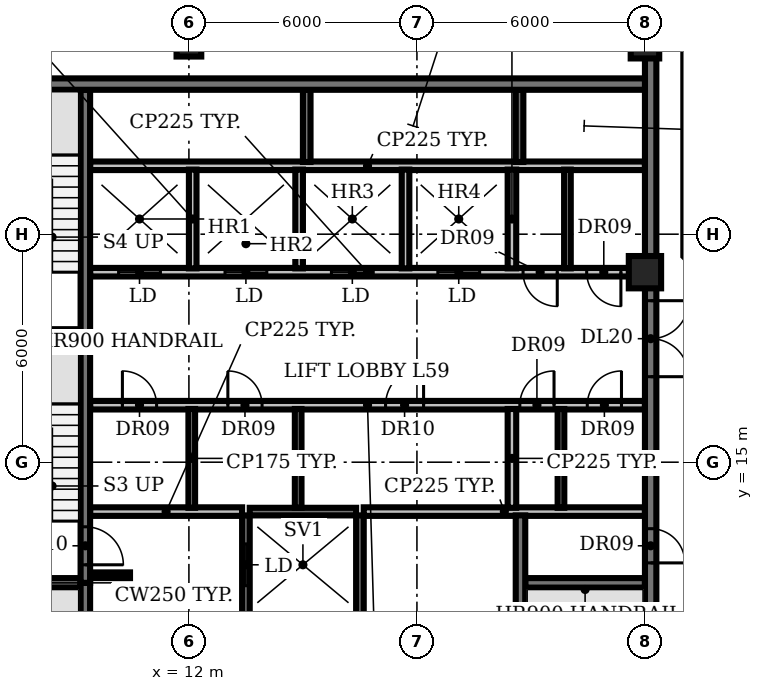
"""IFC4 building model, lengths in metres.
Left out: names, types, materials, properties, quantities, classifications, styles, units other than length and angle.
Written with IfcOpenShell. Run it as: python <this file> out.ifc"""

import sys

from ifc_helpers import new_model, si_unit, direction, frame, frame_2d, origin, origin_2d, place, context, subcontext, project, spatial, rectangle, circle, extrude, element, fill, save


model = new_model("IFC4")
c1 = context("Model", 3, precision=1e-05, world=origin(), true_north=direction((0.0, 1.0)))
c2 = subcontext(c1, "Body", "Model", "MODEL_VIEW")
j1 = project(units=[si_unit("LENGTHUNIT", "METRE"), si_unit("PLANEANGLEUNIT", "RADIAN")], contexts=[c1])
p1 = place(None, origin())
s1 = spatial("IfcSite", under=j1, at=p1, CompositionType="ELEMENT")
p2 = place(p1, origin())
s2 = spatial("IfcBuilding", under=s1, at=p2, CompositionType="ELEMENT")
p3 = place(p2, frame((0.0, 0.0, 268.4)))
s3 = spatial("IfcBuildingStorey", under=s2, at=p3, CompositionType="ELEMENT", Elevation=268.4)
p4 = place(p3, frame((12.0, 26.0, 0.0), z_axis=(0.0, 0.0, 1.0), x_axis=(1.0, 0.0, 0.0)))
e1 = element("IfcColumn", 1, at=p4, inside=s3, PredefinedType="COLUMN", context=c2, shape_type="SweptSolid", body=[
    extrude(rectangle(XDim=0.65, YDim=0.65, at=origin_2d()), origin(), (0.0, 0.0, 1.0), 3.8),
])
p5 = place(p3, frame((24.0, 20.0, 0.0), z_axis=(0.0, 0.0, 1.0), x_axis=(1.0, 0.0, 0.0)))
e2 = element("IfcColumn", 2, at=p5, inside=s3, PredefinedType="COLUMN", context=c2, shape_type="SweptSolid", body=[
    extrude(circle(Radius=0.425, at=origin_2d()), origin(), (0.0, 0.0, 1.0), 3.8),
])
p6 = place(p3, frame((24.0, 26.0, 0.0), z_axis=(0.0, 0.0, 1.0), x_axis=(1.0, 0.0, 0.0)))
e3 = element("IfcColumn", 3, at=p6, inside=s3, PredefinedType="COLUMN", context=c2, shape_type="SweptSolid", body=[
    extrude(rectangle(XDim=0.75, YDim=0.75, at=origin_2d()), origin(), (0.0, 0.0, 1.0), 3.8),
])
for number, where, z_axis, x_axis in (
    (4, (6.0, 11.825, 0.0), (0.0, 0.0, 1.0), (1.0, 0.0, 0.0)),
    (5, (20.85, 11.825, 0.0), (0.0, 0.0, 1.0), (1.0, 0.0, 0.0)),
):
    element("IfcWall", number, at=place(p3, frame(where, z_axis=z_axis, x_axis=x_axis)), inside=s3, PredefinedType="SHEAR", context=c2, shape_type="SweptSolid", body=[
        extrude(rectangle(XDim=3.15, YDim=0.25, at=frame_2d((1.575, 0.0))), origin(), (0.0, 0.0, 1.0), 3.8),
    ])
p7 = place(p3, frame((9.4, 12.025, 0.0), z_axis=(0.0, 0.0, 1.0), x_axis=(1.0, 0.0, 0.0)))
e6 = element("IfcWall", 6, at=p7, inside=s3, PredefinedType="SHEAR", context=c2, shape_type="SweptSolid", body=[
    extrude(rectangle(XDim=1.05, YDim=0.15, at=frame_2d((0.525, 0.0))), origin(), (0.0, 0.0, 1.0), 3.8),
])
p8 = place(p3, frame((9.4, 13.7, 0.0), z_axis=(0.0, 0.0, 1.0), x_axis=(1.0, 0.0, 0.0)))
e7 = element("IfcWall", 7, at=p8, inside=s3, PredefinedType="PARTITIONING", context=c2, shape_type="SweptSolid", body=[
    extrude(rectangle(XDim=4.0, YDim=0.225, at=frame_2d((2.0, 0.0))), origin(), (0.0, 0.0, 1.0), 3.8),
])
p9 = place(p3, frame((13.6, 13.7, 0.0), z_axis=(0.0, 0.0, 1.0), x_axis=(1.0, 0.0, 0.0)))
e8 = element("IfcWall", 8, at=p9, inside=s3, PredefinedType="SHEAR", context=c2, shape_type="SweptSolid", body=[
    extrude(rectangle(XDim=2.8, YDim=0.2, at=frame_2d((1.4, 0.0))), origin(), (0.0, 0.0, 1.0), 3.8),
])
p10 = place(p3, frame((16.6, 13.7, 0.0), z_axis=(0.0, 0.0, 1.0), x_axis=(1.0, 0.0, 0.0)))
e9 = element("IfcWall", 9, at=p10, inside=s3, PredefinedType="PARTITIONING", context=c2, shape_type="SweptSolid", body=[
    extrude(rectangle(XDim=7.4, YDim=0.225, at=frame_2d((3.7, 0.0))), origin(), (0.0, 0.0, 1.0), 3.8),
])
p11 = place(p3, frame((9.4, 16.5, 0.0), z_axis=(0.0, 0.0, 1.0), x_axis=(1.0, 0.0, 0.0)))
e10 = element("IfcWall", 10, at=p11, inside=s3, PredefinedType="PARTITIONING", context=c2, shape_type="SweptSolid", body=[
    extrude(rectangle(XDim=14.6, YDim=0.225, at=frame_2d((7.3, 0.0))), origin(), (0.0, 0.0, 1.0), 3.8),
])
p12 = place(p11, frame((0.85, 0.0, 0.0)))
e11 = element("IfcOpeningElement", 11, at=p12, cuts=e10, PredefinedType="OPENING", context=c2, shape_type="SweptSolid", body=[
    extrude(rectangle(XDim=0.9, YDim=2.1, at=frame_2d((0.45, 1.05))), frame((0.0, 0.123, 0.0), z_axis=(0.0, -1.0, 0.0), x_axis=(1.0, 0.0, 0.0)), (0.0, 0.0, 1.0), 0.245),
])
p13 = place(p11, frame((3.625, 0.0, 0.0)))
e12 = element("IfcOpeningElement", 12, at=p13, cuts=e10, PredefinedType="OPENING", context=c2, shape_type="SweptSolid", body=[
    extrude(rectangle(XDim=0.9, YDim=2.1, at=frame_2d((0.45, 1.05))), frame((0.0, 0.123, 0.0), z_axis=(0.0, -1.0, 0.0), x_axis=(1.0, 0.0, 0.0)), (0.0, 0.0, 1.0), 0.245),
])
p14 = place(p11, frame((7.775, 0.0, 0.0)))
e13 = element("IfcOpeningElement", 13, at=p14, cuts=e10, PredefinedType="OPENING", context=c2, shape_type="SweptSolid", body=[
    extrude(rectangle(XDim=1.0, YDim=2.1, at=frame_2d((0.5, 1.05))), frame((0.0, 0.123, 0.0), z_axis=(0.0, -1.0, 0.0), x_axis=(1.0, 0.0, 0.0)), (0.0, 0.0, 1.0), 0.245),
])
p15 = place(p11, frame((11.308, 0.0, 0.0)))
e14 = element("IfcOpeningElement", 14, at=p15, cuts=e10, PredefinedType="OPENING", context=c2, shape_type="SweptSolid", body=[
    extrude(rectangle(XDim=0.9, YDim=2.1, at=frame_2d((0.45, 1.05))), frame((0.0, 0.123, 0.0), z_axis=(0.0, -1.0, 0.0), x_axis=(1.0, 0.0, 0.0)), (0.0, 0.0, 1.0), 0.245),
])
p16 = place(p11, frame((13.083, 0.0, 0.0)))
e15 = element("IfcOpeningElement", 15, at=p16, cuts=e10, PredefinedType="OPENING", context=c2, shape_type="SweptSolid", body=[
    extrude(rectangle(XDim=0.9, YDim=2.1, at=frame_2d((0.45, 1.05))), frame((0.0, 0.123, 0.0), z_axis=(0.0, -1.0, 0.0), x_axis=(1.0, 0.0, 0.0)), (0.0, 0.0, 1.0), 0.245),
])
p17 = place(p3, frame((6.0, 18.375, 0.0), z_axis=(0.0, 0.0, 1.0), x_axis=(1.0, 0.0, 0.0)))
e16 = element("IfcWall", 16, at=p17, inside=s3, PredefinedType="SHEAR", context=c2, shape_type="SweptSolid", body=[
    extrude(rectangle(XDim=3.15, YDim=0.25, at=frame_2d((1.575, 0.0))), origin(), (0.0, 0.0, 1.0), 3.8),
])
p18 = place(p3, frame((24.0, 20.0, 0.0), z_axis=(0.0, 0.0, 1.0), x_axis=(-1.0, 0.0, 0.0)))
e17 = element("IfcWall", 17, at=p18, inside=s3, PredefinedType="PARTITIONING", context=c2, shape_type="SweptSolid", body=[
    extrude(rectangle(XDim=14.6, YDim=0.225, at=frame_2d((7.3, 0.0))), origin(), (0.0, 0.0, 1.0), 3.8),
])
p19 = place(p18, frame((12.75, 0.0, 0.0)))
e18 = element("IfcOpeningElement", 18, at=p19, cuts=e17, PredefinedType="OPENING", context=c2, shape_type="SweptSolid", body=[
    extrude(rectangle(XDim=1.1, YDim=2.1, at=frame_2d((0.55, 1.05))), frame((0.0, 0.123, 0.0), z_axis=(0.0, -1.0, 0.0), x_axis=(1.0, 0.0, 0.0)), (0.0, 0.0, 1.0), 0.245),
])
p20 = place(p18, frame((9.95, 0.0, 0.0)))
e19 = element("IfcOpeningElement", 19, at=p20, cuts=e17, PredefinedType="OPENING", context=c2, shape_type="SweptSolid", body=[
    extrude(rectangle(XDim=1.1, YDim=2.1, at=frame_2d((0.55, 1.05))), frame((0.0, 0.123, 0.0), z_axis=(0.0, -1.0, 0.0), x_axis=(1.0, 0.0, 0.0)), (0.0, 0.0, 1.0), 0.245),
])
p21 = place(p18, frame((7.15, 0.0, 0.0)))
e20 = element("IfcOpeningElement", 20, at=p21, cuts=e17, PredefinedType="OPENING", context=c2, shape_type="SweptSolid", body=[
    extrude(rectangle(XDim=1.1, YDim=2.1, at=frame_2d((0.55, 1.05))), frame((0.0, 0.123, 0.0), z_axis=(0.0, -1.0, 0.0), x_axis=(1.0, 0.0, 0.0)), (0.0, 0.0, 1.0), 0.245),
])
p22 = place(p18, frame((4.35, 0.0, 0.0)))
e21 = element("IfcOpeningElement", 21, at=p22, cuts=e17, PredefinedType="OPENING", context=c2, shape_type="SweptSolid", body=[
    extrude(rectangle(XDim=1.1, YDim=2.1, at=frame_2d((0.55, 1.05))), frame((0.0, 0.123, 0.0), z_axis=(0.0, -1.0, 0.0), x_axis=(1.0, 0.0, 0.0)), (0.0, 0.0, 1.0), 0.245),
])
p23 = place(p18, frame((2.308, 0.0, 0.0)))
e22 = element("IfcOpeningElement", 22, at=p23, cuts=e17, PredefinedType="OPENING", context=c2, shape_type="SweptSolid", body=[
    extrude(rectangle(XDim=0.9, YDim=2.1, at=frame_2d((0.45, 1.05))), frame((0.0, 0.123, 0.0), z_axis=(0.0, -1.0, 0.0), x_axis=(1.0, 0.0, 0.0)), (0.0, 0.0, 1.0), 0.245),
])
p24 = place(p18, frame((0.633, 0.0, 0.0)))
e23 = element("IfcOpeningElement", 23, at=p24, cuts=e17, PredefinedType="OPENING", context=c2, shape_type="SweptSolid", body=[
    extrude(rectangle(XDim=0.9, YDim=2.1, at=frame_2d((0.45, 1.05))), frame((0.0, 0.123, 0.0), z_axis=(0.0, -1.0, 0.0), x_axis=(1.0, 0.0, 0.0)), (0.0, 0.0, 1.0), 0.245),
])
p25 = place(p3, frame((9.4, 22.8, 0.0), z_axis=(0.0, 0.0, 1.0), x_axis=(1.0, 0.0, 0.0)))
e24 = element("IfcWall", 24, at=p25, inside=s3, PredefinedType="PARTITIONING", context=c2, shape_type="SweptSolid", body=[
    extrude(rectangle(XDim=14.6, YDim=0.225, at=frame_2d((7.3, 0.0))), origin(), (0.0, 0.0, 1.0), 3.8),
])
p26 = place(p3, frame((9.275, 11.825, 0.0), z_axis=(0.0, 0.0, 1.0), x_axis=(0.0, -1.0, 0.0)))
e25 = element("IfcWall", 25, at=p26, inside=s3, PredefinedType="SHEAR", context=c2, shape_type="SweptSolid", body=[
    extrude(rectangle(XDim=6.425, YDim=0.25, at=frame_2d((3.212, 0.0))), origin(), (0.0, 0.0, 1.0), 3.8),
])
p27 = place(p26, frame((5.075, 0.0, 0.0)))
e26 = element("IfcOpeningElement", 26, at=p27, cuts=e25, PredefinedType="OPENING", context=c2, shape_type="SweptSolid", body=[
    extrude(rectangle(XDim=1.0, YDim=2.1, at=frame_2d((0.5, 1.05))), frame((0.0, 0.135, 0.0), z_axis=(0.0, -1.0, 0.0), x_axis=(1.0, 0.0, 0.0)), (0.0, 0.0, 1.0), 0.27),
])
p28 = place(p3, frame((9.275, 18.375, 0.0), z_axis=(0.0, 0.0, 1.0), x_axis=(0.0, -1.0, 0.0)))
e27 = element("IfcWall", 27, at=p28, inside=s3, PredefinedType="SHEAR", context=c2, shape_type="SweptSolid", body=[
    extrude(rectangle(XDim=6.55, YDim=0.25, at=frame_2d((3.275, 0.0))), origin(), (0.0, 0.0, 1.0), 3.8),
])
p29 = place(p28, frame((5.075, 0.0, 0.0)))
e28 = element("IfcOpeningElement", 28, at=p29, cuts=e27, PredefinedType="OPENING", context=c2, shape_type="SweptSolid", body=[
    extrude(rectangle(XDim=1.0, YDim=2.1, at=frame_2d((0.5, 1.05))), frame((0.0, 0.135, 0.0), z_axis=(0.0, -1.0, 0.0), x_axis=(1.0, 0.0, 0.0)), (0.0, 0.0, 1.0), 0.27),
])
p30 = place(p3, frame((9.275, 18.375, 0.0), z_axis=(0.0, 0.0, 1.0), x_axis=(0.0, 1.0, 0.0)))
e29 = element("IfcWall", 29, at=p30, inside=s3, PredefinedType="SHEAR", context=c2, shape_type="SweptSolid", body=[
    extrude(rectangle(XDim=6.425, YDim=0.25, at=frame_2d((3.212, 0.0))), origin(), (0.0, 0.0, 1.0), 3.8),
])
p31 = place(p3, frame((12.075, 13.8, 0.0), z_axis=(0.0, 0.0, 1.0), x_axis=(0.0, 1.0, 0.0)))
e30 = element("IfcWall", 30, at=p31, inside=s3, PredefinedType="PARTITIONING", context=c2, shape_type="SweptSolid", body=[
    extrude(rectangle(XDim=2.6, YDim=0.175, at=frame_2d((1.3, 0.0))), origin(), (0.0, 0.0, 1.0), 3.8),
])
p32 = place(p3, frame((12.1, 20.1, 0.0), z_axis=(0.0, 0.0, 1.0), x_axis=(0.0, 1.0, 0.0)))
e31 = element("IfcWall", 31, at=p32, inside=s3, PredefinedType="SOLIDWALL", context=c2, shape_type="SweptSolid", body=[
    extrude(rectangle(XDim=2.6, YDim=0.2, at=frame_2d((1.3, 0.0))), origin(), (0.0, 0.0, 1.0), 3.8),
])
p33 = place(p3, frame((13.5, 5.4, 0.0), z_axis=(0.0, 0.0, 1.0), x_axis=(0.0, 1.0, 0.0)))
e32 = element("IfcWall", 32, at=p33, inside=s3, PredefinedType="SHEAR", context=c2, shape_type="SweptSolid", body=[
    extrude(rectangle(XDim=8.2, YDim=0.2, at=frame_2d((4.1, 0.0))), origin(), (0.0, 0.0, 1.0), 3.8),
])
p34 = place(p33, frame((0.75, 0.0, 0.0)))
e33 = element("IfcOpeningElement", 33, at=p34, cuts=e32, PredefinedType="OPENING", context=c2, shape_type="SweptSolid", body=[
    extrude(rectangle(XDim=1.1, YDim=2.1, at=frame_2d((0.55, 1.05))), frame((0.0, 0.11, 0.0), z_axis=(0.0, -1.0, 0.0), x_axis=(1.0, 0.0, 0.0)), (0.0, 0.0, 1.0), 0.22),
])
p35 = place(p33, frame((3.55, 0.0, 0.0)))
e34 = element("IfcOpeningElement", 34, at=p35, cuts=e32, PredefinedType="OPENING", context=c2, shape_type="SweptSolid", body=[
    extrude(rectangle(XDim=1.1, YDim=2.1, at=frame_2d((0.55, 1.05))), frame((0.0, 0.11, 0.0), z_axis=(0.0, -1.0, 0.0), x_axis=(1.0, 0.0, 0.0)), (0.0, 0.0, 1.0), 0.22),
])
p36 = place(p33, frame((6.35, 0.0, 0.0)))
e35 = element("IfcOpeningElement", 35, at=p36, cuts=e32, PredefinedType="OPENING", context=c2, shape_type="SweptSolid", body=[
    extrude(rectangle(XDim=1.1, YDim=2.1, at=frame_2d((0.55, 1.05))), frame((0.0, 0.11, 0.0), z_axis=(0.0, -1.0, 0.0), x_axis=(1.0, 0.0, 0.0)), (0.0, 0.0, 1.0), 0.22),
])
p37 = place(p3, frame((14.875, 13.8, 0.0), z_axis=(0.0, 0.0, 1.0), x_axis=(0.0, 1.0, 0.0)))
e36 = element("IfcWall", 36, at=p37, inside=s3, PredefinedType="PARTITIONING", context=c2, shape_type="SweptSolid", body=[
    extrude(rectangle(XDim=2.6, YDim=0.175, at=frame_2d((1.3, 0.0))), origin(), (0.0, 0.0, 1.0), 3.8),
])
p38 = place(p3, frame((14.9, 20.1, 0.0), z_axis=(0.0, 0.0, 1.0), x_axis=(0.0, 1.0, 0.0)))
e37 = element("IfcWall", 37, at=p38, inside=s3, PredefinedType="SOLIDWALL", context=c2, shape_type="SweptSolid", body=[
    extrude(rectangle(XDim=2.6, YDim=0.2, at=frame_2d((1.3, 0.0))), origin(), (0.0, 0.0, 1.0), 3.8),
])
p39 = place(p3, frame((15.1, 22.9, 0.0), z_axis=(0.0, 0.0, 1.0), x_axis=(0.0, 1.0, 0.0)))
e38 = element("IfcWall", 38, at=p39, inside=s3, PredefinedType="SHEAR", context=c2, shape_type="SweptSolid", body=[
    extrude(rectangle(XDim=1.9, YDim=0.2, at=frame_2d((0.95, 0.0))), origin(), (0.0, 0.0, 1.0), 3.8),
])
p40 = place(p3, frame((16.5, 5.4, 0.0), z_axis=(0.0, 0.0, 1.0), x_axis=(0.0, 1.0, 0.0)))
e39 = element("IfcWall", 39, at=p40, inside=s3, PredefinedType="SHEAR", context=c2, shape_type="SweptSolid", body=[
    extrude(rectangle(XDim=8.2, YDim=0.2, at=frame_2d((4.1, 0.0))), origin(), (0.0, 0.0, 1.0), 3.8),
])
p41 = place(p3, frame((17.7, 20.1, 0.0), z_axis=(0.0, 0.0, 1.0), x_axis=(0.0, 1.0, 0.0)))
e40 = element("IfcWall", 40, at=p41, inside=s3, PredefinedType="SOLIDWALL", context=c2, shape_type="SweptSolid", body=[
    extrude(rectangle(XDim=2.6, YDim=0.2, at=frame_2d((1.3, 0.0))), origin(), (0.0, 0.0, 1.0), 3.8),
])
for number, where, z_axis, x_axis in (
    (41, (20.5, 13.8, 0.0), (0.0, 0.0, 1.0), (0.0, 1.0, 0.0)),
    (42, (20.5, 20.1, 0.0), (0.0, 0.0, 1.0), (0.0, 1.0, 0.0)),
):
    element("IfcWall", number, at=place(p3, frame(where, z_axis=z_axis, x_axis=x_axis)), inside=s3, PredefinedType="PARTITIONING", context=c2, shape_type="SweptSolid", body=[
        extrude(rectangle(XDim=2.6, YDim=0.225, at=frame_2d((1.3, 0.0))), origin(), (0.0, 0.0, 1.0), 3.8),
    ])
p42 = place(p3, frame((20.7, 22.9, 0.0), z_axis=(0.0, 0.0, 1.0), x_axis=(0.0, 1.0, 0.0)))
e43 = element("IfcWall", 43, at=p42, inside=s3, PredefinedType="SHEAR", context=c2, shape_type="SweptSolid", body=[
    extrude(rectangle(XDim=1.9, YDim=0.2, at=frame_2d((0.95, 0.0))), origin(), (0.0, 0.0, 1.0), 3.8),
])
p43 = place(p3, frame((20.725, 5.4, 0.0), z_axis=(0.0, 0.0, 1.0), x_axis=(0.0, 1.0, 0.0)))
e44 = element("IfcWall", 44, at=p43, inside=s3, PredefinedType="SHEAR", context=c2, shape_type="SweptSolid", body=[
    extrude(rectangle(XDim=8.2, YDim=0.25, at=frame_2d((4.1, 0.0))), origin(), (0.0, 0.0, 1.0), 3.8),
])
for number, where, z_axis, x_axis in (
    (45, (21.79, 13.8, 0.0), (0.0, 0.0, 1.0), (0.0, 1.0, 0.0)),
    (46, (21.96, 20.1, 0.0), (0.0, 0.0, 1.0), (0.0, 1.0, 0.0)),
):
    element("IfcWall", number, at=place(p3, frame(where, z_axis=z_axis, x_axis=x_axis)), inside=s3, PredefinedType="PARTITIONING", context=c2, shape_type="SweptSolid", body=[
        extrude(rectangle(XDim=2.6, YDim=0.175, at=frame_2d((1.3, 0.0))), origin(), (0.0, 0.0, 1.0), 3.8),
    ])
p44 = place(p3, frame((24.15, 25.655, 0.0), z_axis=(0.0, 0.0, 1.0), x_axis=(0.0, -1.0, 0.0)))
e47 = element("IfcWall", 47, at=p44, inside=s3, PredefinedType="SHEAR", context=c2, shape_type="SweptSolid", body=[
    extrude(rectangle(XDim=20.555, YDim=0.3, at=frame_2d((10.277, 0.0))), origin(), (0.0, 0.0, 1.0), 3.8),
])
p45 = place(p44, frame((18.505, 0.0, 0.0)))
e48 = element("IfcOpeningElement", 48, at=p45, cuts=e47, PredefinedType="OPENING", context=c2, shape_type="SweptSolid", body=[
    extrude(rectangle(XDim=1.5, YDim=2.1, at=frame_2d((0.75, 1.05))), frame((0.0, 0.16, 0.0), z_axis=(0.0, -1.0, 0.0), x_axis=(1.0, 0.0, 0.0)), (0.0, 0.0, 1.0), 0.32),
])
p46 = place(p44, frame((12.405, 0.0, 0.0)))
e49 = element("IfcOpeningElement", 49, at=p46, cuts=e47, PredefinedType="OPENING", context=c2, shape_type="SweptSolid", body=[
    extrude(rectangle(XDim=0.9, YDim=2.1, at=frame_2d((0.45, 1.05))), frame((0.0, 0.16, 0.0), z_axis=(0.0, -1.0, 0.0), x_axis=(1.0, 0.0, 0.0)), (0.0, 0.0, 1.0), 0.32),
])
p47 = place(p44, frame((6.405, 0.0, 0.0)))
e50 = element("IfcOpeningElement", 50, at=p47, cuts=e47, PredefinedType="OPENING", context=c2, shape_type="SweptSolid", body=[
    extrude(rectangle(XDim=2.0, YDim=2.1, at=frame_2d((1.0, 1.05))), frame((0.0, 0.16, 0.0), z_axis=(0.0, -1.0, 0.0), x_axis=(1.0, 0.0, 0.0)), (0.0, 0.0, 1.0), 0.32),
])
p48 = place(p3, frame((6.0, 24.95, 0.0), z_axis=(0.0, 0.0, 1.0), x_axis=(1.0, 0.0, 0.0)))
e51 = element("IfcWall", 51, at=p48, inside=s3, PredefinedType="SHEAR", context=c2, shape_type="SweptSolid", body=[
    extrude(rectangle(XDim=18.0, YDim=0.3, at=frame_2d((9.0, 0.0))), origin(), (0.0, 0.0, 1.0), 3.8),
])
p49 = place(p12, origin())
e52 = element("IfcDoor", 52, at=p49, inside=s3, OperationType="SINGLE_SWING_LEFT", PredefinedType="DOOR", context=c2, shape_type="SweptSolid", body=[
    extrude(rectangle(XDim=0.9, YDim=2.1, at=frame_2d((0.45, 1.05))), frame((0.0, 0.025, 0.0), z_axis=(0.0, -1.0, 0.0), x_axis=(1.0, 0.0, 0.0)), (0.0, 0.0, 1.0), 0.05),
])
fill(e11, e52)
p50 = place(p13, origin())
e53 = element("IfcDoor", 53, at=p50, inside=s3, OperationType="SINGLE_SWING_LEFT", PredefinedType="DOOR", context=c2, shape_type="SweptSolid", body=[
    extrude(rectangle(XDim=0.9, YDim=2.1, at=frame_2d((0.45, 1.05))), frame((0.0, 0.025, 0.0), z_axis=(0.0, -1.0, 0.0), x_axis=(1.0, 0.0, 0.0)), (0.0, 0.0, 1.0), 0.05),
])
fill(e12, e53)
p51 = place(p14, origin())
e54 = element("IfcDoor", 54, at=p51, inside=s3, OperationType="SINGLE_SWING_RIGHT", PredefinedType="DOOR", context=c2, shape_type="SweptSolid", body=[
    extrude(rectangle(XDim=1.0, YDim=2.1, at=frame_2d((0.5, 1.05))), frame((0.0, 0.025, 0.0), z_axis=(0.0, -1.0, 0.0), x_axis=(1.0, 0.0, 0.0)), (0.0, 0.0, 1.0), 0.05),
])
fill(e13, e54)
p52 = place(p15, origin())
e55 = element("IfcDoor", 55, at=p52, inside=s3, OperationType="SINGLE_SWING_RIGHT", PredefinedType="DOOR", context=c2, shape_type="SweptSolid", body=[
    extrude(rectangle(XDim=0.9, YDim=2.1, at=frame_2d((0.45, 1.05))), frame((0.0, 0.025, 0.0), z_axis=(0.0, -1.0, 0.0), x_axis=(1.0, 0.0, 0.0)), (0.0, 0.0, 1.0), 0.05),
])
fill(e14, e55)
p53 = place(p16, origin())
e56 = element("IfcDoor", 56, at=p53, inside=s3, OperationType="SINGLE_SWING_RIGHT", PredefinedType="DOOR", context=c2, shape_type="SweptSolid", body=[
    extrude(rectangle(XDim=0.9, YDim=2.1, at=frame_2d((0.45, 1.05))), frame((0.0, 0.025, 0.0), z_axis=(0.0, -1.0, 0.0), x_axis=(1.0, 0.0, 0.0)), (0.0, 0.0, 1.0), 0.05),
])
fill(e15, e56)
p54 = place(p19, origin())
e57 = element("IfcDoor", 57, at=p54, inside=s3, OperationType="DOUBLE_DOOR_SLIDING", PredefinedType="DOOR", context=c2, shape_type="SweptSolid", body=[
    extrude(rectangle(XDim=1.1, YDim=2.1, at=frame_2d((0.55, 1.05))), frame((0.0, 0.025, 0.0), z_axis=(0.0, -1.0, 0.0), x_axis=(1.0, 0.0, 0.0)), (0.0, 0.0, 1.0), 0.05),
])
fill(e18, e57)
p55 = place(p20, origin())
e58 = element("IfcDoor", 58, at=p55, inside=s3, OperationType="DOUBLE_DOOR_SLIDING", PredefinedType="DOOR", context=c2, shape_type="SweptSolid", body=[
    extrude(rectangle(XDim=1.1, YDim=2.1, at=frame_2d((0.55, 1.05))), frame((0.0, 0.025, 0.0), z_axis=(0.0, -1.0, 0.0), x_axis=(1.0, 0.0, 0.0)), (0.0, 0.0, 1.0), 0.05),
])
fill(e19, e58)
p56 = place(p21, origin())
e59 = element("IfcDoor", 59, at=p56, inside=s3, OperationType="DOUBLE_DOOR_SLIDING", PredefinedType="DOOR", context=c2, shape_type="SweptSolid", body=[
    extrude(rectangle(XDim=1.1, YDim=2.1, at=frame_2d((0.55, 1.05))), frame((0.0, 0.025, 0.0), z_axis=(0.0, -1.0, 0.0), x_axis=(1.0, 0.0, 0.0)), (0.0, 0.0, 1.0), 0.05),
])
fill(e20, e59)
p57 = place(p22, origin())
e60 = element("IfcDoor", 60, at=p57, inside=s3, OperationType="DOUBLE_DOOR_SLIDING", PredefinedType="DOOR", context=c2, shape_type="SweptSolid", body=[
    extrude(rectangle(XDim=1.1, YDim=2.1, at=frame_2d((0.55, 1.05))), frame((0.0, 0.025, 0.0), z_axis=(0.0, -1.0, 0.0), x_axis=(1.0, 0.0, 0.0)), (0.0, 0.0, 1.0), 0.05),
])
fill(e21, e60)
p58 = place(p23, origin())
e61 = element("IfcDoor", 61, at=p58, inside=s3, OperationType="SINGLE_SWING_LEFT", PredefinedType="DOOR", context=c2, shape_type="SweptSolid", body=[
    extrude(rectangle(XDim=0.9, YDim=2.1, at=frame_2d((0.45, 1.05))), frame((0.0, 0.025, 0.0), z_axis=(0.0, -1.0, 0.0), x_axis=(1.0, 0.0, 0.0)), (0.0, 0.0, 1.0), 0.05),
])
fill(e22, e61)
p59 = place(p24, origin())
e62 = element("IfcDoor", 62, at=p59, inside=s3, OperationType="SINGLE_SWING_LEFT", PredefinedType="DOOR", context=c2, shape_type="SweptSolid", body=[
    extrude(rectangle(XDim=0.9, YDim=2.1, at=frame_2d((0.45, 1.05))), frame((0.0, 0.025, 0.0), z_axis=(0.0, -1.0, 0.0), x_axis=(1.0, 0.0, 0.0)), (0.0, 0.0, 1.0), 0.05),
])
fill(e23, e62)
p60 = place(p29, origin())
e63 = element("IfcDoor", 63, at=p60, inside=s3, OperationType="SINGLE_SWING_RIGHT", PredefinedType="DOOR", context=c2, shape_type="SweptSolid", body=[
    extrude(rectangle(XDim=1.0, YDim=2.1, at=frame_2d((0.5, 1.05))), frame((0.0, 0.025, 0.0), z_axis=(0.0, -1.0, 0.0), x_axis=(1.0, 0.0, 0.0)), (0.0, 0.0, 1.0), 0.05),
])
fill(e28, e63)
p61 = place(p36, origin())
e64 = element("IfcDoor", 64, at=p61, inside=s3, OperationType="DOUBLE_DOOR_SLIDING", PredefinedType="DOOR", context=c2, shape_type="SweptSolid", body=[
    extrude(rectangle(XDim=1.1, YDim=2.1, at=frame_2d((0.55, 1.05))), frame((0.0, 0.025, 0.0), z_axis=(0.0, -1.0, 0.0), x_axis=(1.0, 0.0, 0.0)), (0.0, 0.0, 1.0), 0.05),
])
fill(e35, e64)
p62 = place(p46, origin())
e65 = element("IfcDoor", 65, at=p62, inside=s3, OperationType="SINGLE_SWING_RIGHT", PredefinedType="DOOR", context=c2, shape_type="SweptSolid", body=[
    extrude(rectangle(XDim=0.9, YDim=2.1, at=frame_2d((0.45, 1.05))), frame((0.0, 0.025, 0.0), z_axis=(0.0, -1.0, 0.0), x_axis=(1.0, 0.0, 0.0)), (0.0, 0.0, 1.0), 0.05),
])
fill(e49, e65)
p63 = place(p47, origin())
e66 = element("IfcDoor", 66, at=p63, inside=s3, OperationType="DOUBLE_DOOR_SINGLE_SWING", PredefinedType="DOOR", context=c2, shape_type="SweptSolid", body=[
    extrude(rectangle(XDim=2.0, YDim=2.1, at=frame_2d((1.0, 1.05))), frame((0.0, 0.025, 0.0), z_axis=(0.0, -1.0, 0.0), x_axis=(1.0, 0.0, 0.0)), (0.0, 0.0, 1.0), 0.05),
])
fill(e50, e66)
save(model, sys.argv[1])
